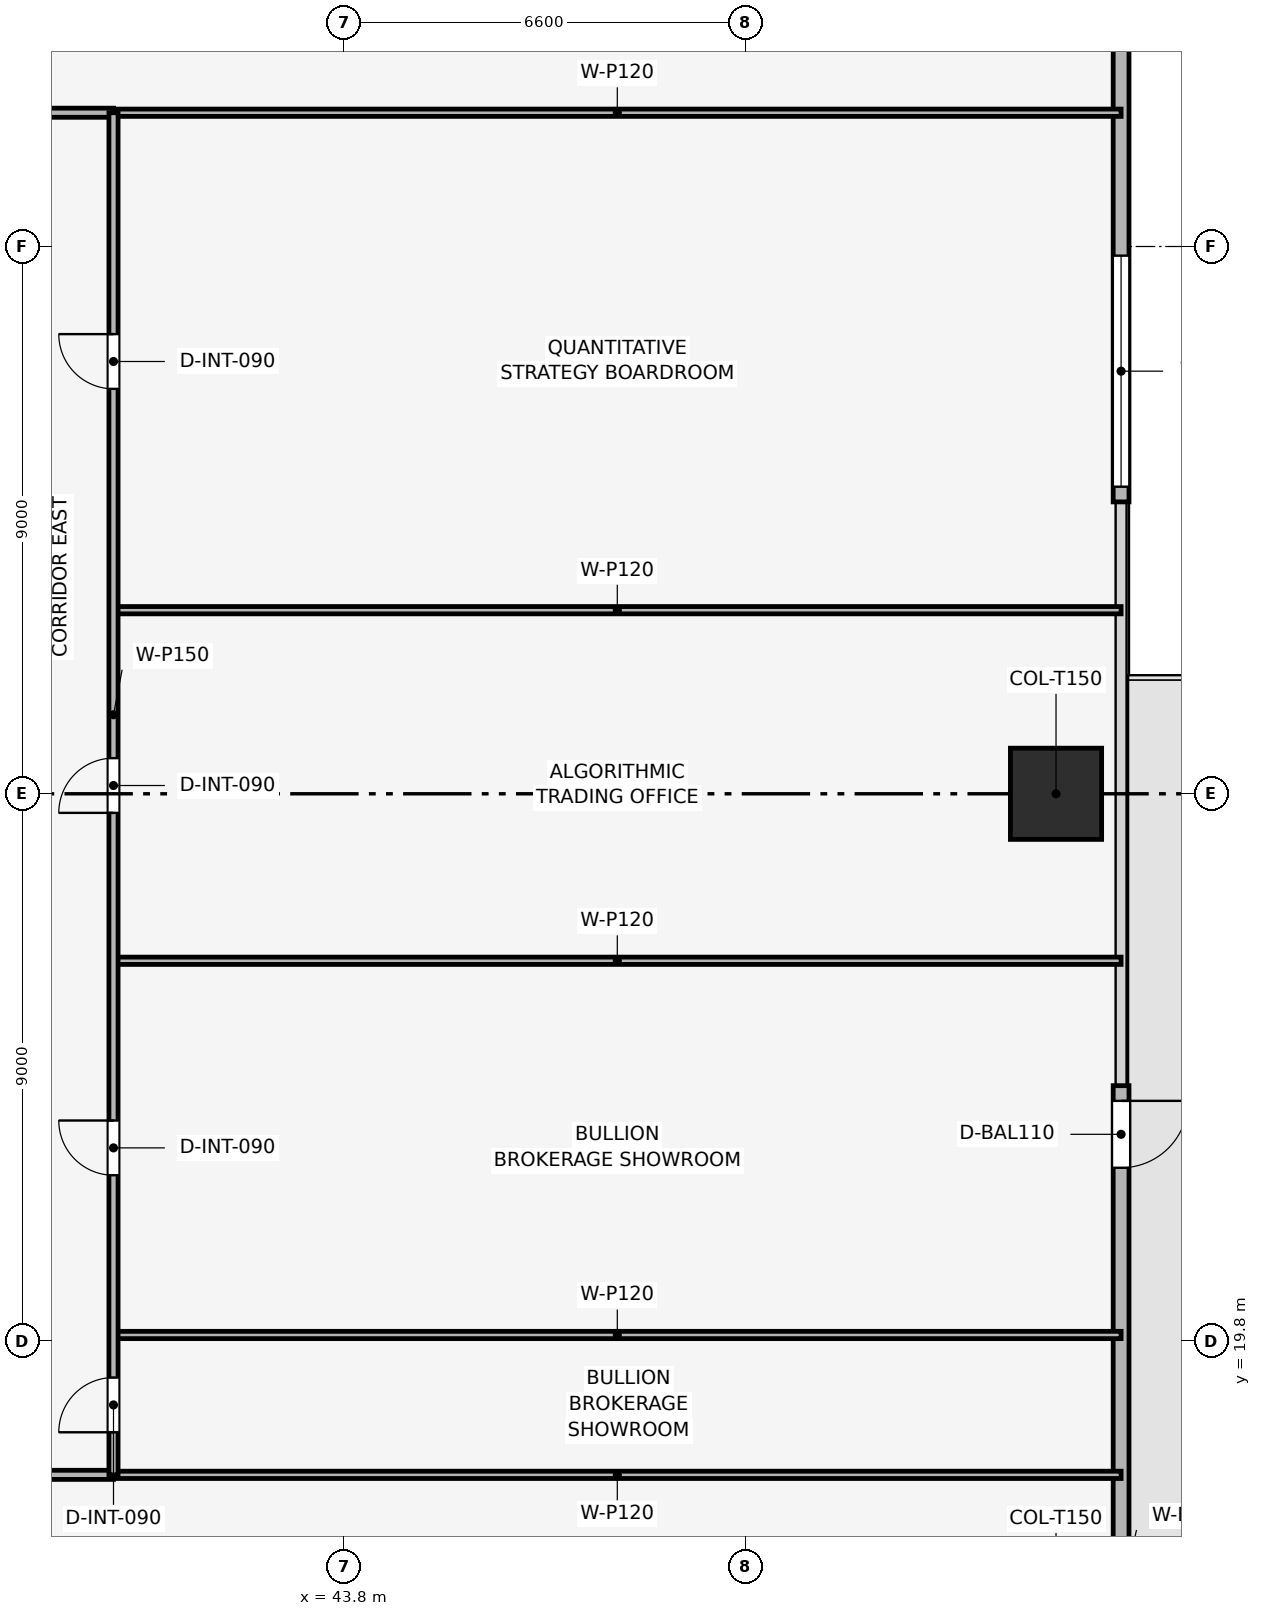
"""IFC4 building model, lengths in metres.
Left out: names, types, materials, properties, quantities, classifications, styles, units other than length and angle.
Written with IfcOpenShell. Run it as: python <this file> out.ifc"""

import sys

from ifc_helpers import new_model, si_unit, direction, frame, frame_2d, origin, origin_2d, place, context, subcontext, project, spatial, rectangle, extrude, element, fill, save


model = new_model("IFC4")
c1 = context("Model", 3, precision=1e-05, world=origin(), true_north=direction((0.0, 1.0)))
c2 = subcontext(c1, "Body", "Model", "MODEL_VIEW")
j1 = project(units=[si_unit("LENGTHUNIT", "METRE"), si_unit("PLANEANGLEUNIT", "RADIAN")], contexts=[c1])
p1 = place(None, origin())
s1 = spatial("IfcSite", under=j1, at=p1, CompositionType="ELEMENT")
p2 = place(p1, origin())
s2 = spatial("IfcBuilding", under=s1, at=p2, CompositionType="ELEMENT")
p3 = place(p2, frame((0.0, 0.0, 76.8)))
s3 = spatial("IfcBuildingStorey", under=s2, at=p3, CompositionType="ELEMENT", Elevation=76.8)
p4 = place(p3, frame((55.5, 28.8, 0.003), z_axis=(0.0, 0.0, 1.0), x_axis=(1.0, 0.0, 0.0)))
e1 = element("IfcColumn", 1, at=p4, inside=s3, PredefinedType="COLUMN", context=c2, shape_type="SweptSolid", body=[
    extrude(rectangle(XDim=1.5, YDim=1.5, at=origin_2d()), origin(), (0.0, 0.0, 1.0), 3.644),
])
p5 = place(p3, frame((56.57, 48.9, 0.0), z_axis=(0.0, 0.0, 1.0), x_axis=(0.0, -1.0, 0.0)))
e2 = element("IfcWall", 2, at=p5, inside=s3, PredefinedType="SOLIDWALL", context=c2, shape_type="SweptSolid", body=[
    extrude(rectangle(XDim=15.3, YDim=0.26, at=frame_2d((7.65, 0.0))), origin(), (0.0, 0.0, 1.0), 3.65),
])
p6 = place(p5, frame((11.25, 0.0, 0.9)))
e3 = element("IfcOpeningElement", 3, at=p6, cuts=e2, PredefinedType="OPENING", context=c2, shape_type="SweptSolid", body=[
    extrude(rectangle(XDim=3.8, YDim=1.9, at=frame_2d((1.9, 0.95))), frame((0.0, 0.14, 0.0), z_axis=(0.0, -1.0, 0.0), x_axis=(1.0, 0.0, 0.0)), (0.0, 0.0, 1.0), 0.28),
])
p7 = place(p3, frame((56.57, 24.0, 0.0), z_axis=(0.0, 0.0, 1.0), x_axis=(0.0, -1.0, 0.0)))
e4 = element("IfcWall", 4, at=p7, inside=s3, PredefinedType="SOLIDWALL", context=c2, shape_type="SweptSolid", body=[
    extrude(rectangle(XDim=15.3, YDim=0.26, at=frame_2d((7.65, 0.0))), origin(), (0.0, 0.0, 1.0), 3.65),
])
p8 = place(p7, frame((0.25, 0.0, 0.0)))
e5 = element("IfcOpeningElement", 5, at=p8, cuts=e4, PredefinedType="OPENING", context=c2, shape_type="SweptSolid", body=[
    extrude(rectangle(XDim=1.1, YDim=2.2, at=frame_2d((0.55, 1.1))), frame((0.0, 0.14, 0.0), z_axis=(0.0, -1.0, 0.0), x_axis=(1.0, 0.0, 0.0)), (0.0, 0.0, 1.0), 0.28),
])
for number, where, z_axis, x_axis in (
    (6, (40.0, 17.6, 0.0), (0.0, 0.0, 1.0), (1.0, 0.0, 0.0)),
    (7, (40.0, 40.0, 0.0), (0.0, 0.0, 1.0), (1.0, 0.0, 0.0)),
    (8, (40.0, 19.9, 0.0), (0.0, 0.0, 1.0), (1.0, 0.0, 0.0)),
    (9, (40.0, 26.054, 0.0), (0.0, 0.0, 1.0), (1.0, 0.0, 0.0)),
    (10, (40.0, 31.819, 0.0), (0.0, 0.0, 1.0), (1.0, 0.0, 0.0)),
):
    element("IfcWall", number, at=place(p3, frame(where, z_axis=z_axis, x_axis=x_axis)), inside=s3, PredefinedType="PARTITIONING", context=c2, shape_type="SweptSolid", body=[
        extrude(rectangle(XDim=16.57, YDim=0.12, at=frame_2d((8.285, 0.0))), origin(), (0.0, 0.0, 1.0), 2.935),
    ])
p9 = place(p3, frame((17.6, 17.6, 0.0), z_axis=(0.0, 0.0, 1.0), x_axis=(1.0, 0.0, 0.0)))
e11 = element("IfcWall", 11, at=p9, inside=s3, PredefinedType="PARTITIONING", context=c2, shape_type="SweptSolid", body=[
    extrude(rectangle(XDim=22.4, YDim=0.15, at=frame_2d((11.2, 0.0))), origin(), (0.0, 0.0, 1.0), 3.085),
])
p10 = place(p9, frame((0.7, 0.0, 0.0)))
e12 = element("IfcOpeningElement", 12, at=p10, cuts=e11, PredefinedType="OPENING", context=c2, shape_type="SweptSolid", body=[
    extrude(rectangle(XDim=0.9, YDim=2.1, at=frame_2d((0.45, 1.05))), frame((0.0, 0.085, 0.0), z_axis=(0.0, -1.0, 0.0), x_axis=(1.0, 0.0, 0.0)), (0.0, 0.0, 1.0), 0.17),
])
p11 = place(p9, frame((6.352, 0.0, 0.0)))
e13 = element("IfcOpeningElement", 13, at=p11, cuts=e11, PredefinedType="OPENING", context=c2, shape_type="SweptSolid", body=[
    extrude(rectangle(XDim=0.9, YDim=2.1, at=frame_2d((0.45, 1.05))), frame((0.0, 0.085, 0.0), z_axis=(0.0, -1.0, 0.0), x_axis=(1.0, 0.0, 0.0)), (0.0, 0.0, 1.0), 0.17),
])
p12 = place(p9, frame((16.402, 0.0, 0.0)))
e14 = element("IfcOpeningElement", 14, at=p12, cuts=e11, PredefinedType="OPENING", context=c2, shape_type="SweptSolid", body=[
    extrude(rectangle(XDim=0.9, YDim=2.1, at=frame_2d((0.45, 1.05))), frame((0.0, 0.085, 0.0), z_axis=(0.0, -1.0, 0.0), x_axis=(1.0, 0.0, 0.0)), (0.0, 0.0, 1.0), 0.17),
])
p13 = place(p3, frame((17.6, 40.0, 0.0), z_axis=(0.0, 0.0, 1.0), x_axis=(1.0, 0.0, 0.0)))
e15 = element("IfcWall", 15, at=p13, inside=s3, PredefinedType="PARTITIONING", context=c2, shape_type="SweptSolid", body=[
    extrude(rectangle(XDim=22.4, YDim=0.15, at=frame_2d((11.2, 0.0))), origin(), (0.0, 0.0, 1.0), 3.085),
])
p14 = place(p13, frame((4.438, 0.0, 0.0)))
e16 = element("IfcOpeningElement", 16, at=p14, cuts=e15, PredefinedType="OPENING", context=c2, shape_type="SweptSolid", body=[
    extrude(rectangle(XDim=0.9, YDim=2.1, at=frame_2d((0.45, 1.05))), frame((0.0, 0.085, 0.0), z_axis=(0.0, -1.0, 0.0), x_axis=(1.0, 0.0, 0.0)), (0.0, 0.0, 1.0), 0.17),
])
p15 = place(p13, frame((15.638, 0.0, 0.0)))
e17 = element("IfcOpeningElement", 17, at=p15, cuts=e15, PredefinedType="OPENING", context=c2, shape_type="SweptSolid", body=[
    extrude(rectangle(XDim=0.9, YDim=2.1, at=frame_2d((0.45, 1.05))), frame((0.0, 0.085, 0.0), z_axis=(0.0, -1.0, 0.0), x_axis=(1.0, 0.0, 0.0)), (0.0, 0.0, 1.0), 0.17),
])
p16 = place(p3, frame((40.0, 17.6, 0.0), z_axis=(0.0, 0.0, 1.0), x_axis=(0.0, 1.0, 0.0)))
e18 = element("IfcWall", 18, at=p16, inside=s3, PredefinedType="PARTITIONING", context=c2, shape_type="SweptSolid", body=[
    extrude(rectangle(XDim=22.4, YDim=0.15, at=frame_2d((11.2, 0.0))), origin(), (0.0, 0.0, 1.0), 3.085),
])
p17 = place(p16, frame((0.7, 0.0, 0.0)))
e19 = element("IfcOpeningElement", 19, at=p17, cuts=e18, PredefinedType="OPENING", context=c2, shape_type="SweptSolid", body=[
    extrude(rectangle(XDim=0.9, YDim=2.1, at=frame_2d((0.45, 1.05))), frame((0.0, 0.085, 0.0), z_axis=(0.0, -1.0, 0.0), x_axis=(1.0, 0.0, 0.0)), (0.0, 0.0, 1.0), 0.17),
])
p18 = place(p16, frame((4.927, 0.0, 0.0)))
e20 = element("IfcOpeningElement", 20, at=p18, cuts=e18, PredefinedType="OPENING", context=c2, shape_type="SweptSolid", body=[
    extrude(rectangle(XDim=0.9, YDim=2.1, at=frame_2d((0.45, 1.05))), frame((0.0, 0.085, 0.0), z_axis=(0.0, -1.0, 0.0), x_axis=(1.0, 0.0, 0.0)), (0.0, 0.0, 1.0), 0.17),
])
p19 = place(p16, frame((10.886, 0.0, 0.0)))
e21 = element("IfcOpeningElement", 21, at=p19, cuts=e18, PredefinedType="OPENING", context=c2, shape_type="SweptSolid", body=[
    extrude(rectangle(XDim=0.9, YDim=2.1, at=frame_2d((0.45, 1.05))), frame((0.0, 0.085, 0.0), z_axis=(0.0, -1.0, 0.0), x_axis=(1.0, 0.0, 0.0)), (0.0, 0.0, 1.0), 0.17),
])
p20 = place(p16, frame((17.859, 0.0, 0.0)))
e22 = element("IfcOpeningElement", 22, at=p20, cuts=e18, PredefinedType="OPENING", context=c2, shape_type="SweptSolid", body=[
    extrude(rectangle(XDim=0.9, YDim=2.1, at=frame_2d((0.45, 1.05))), frame((0.0, 0.085, 0.0), z_axis=(0.0, -1.0, 0.0), x_axis=(1.0, 0.0, 0.0)), (0.0, 0.0, 1.0), 0.17),
])
p21 = place(p8, origin())
e23 = element("IfcDoor", 23, at=p21, inside=s3, OperationType="SINGLE_SWING_LEFT", PredefinedType="DOOR", context=c2, shape_type="SweptSolid", body=[
    extrude(rectangle(XDim=1.1, YDim=2.2, at=frame_2d((0.55, 1.1))), frame((0.0, 0.025, 0.0), z_axis=(0.0, -1.0, 0.0), x_axis=(1.0, 0.0, 0.0)), (0.0, 0.0, 1.0), 0.05),
])
fill(e5, e23)
p22 = place(p6, origin())
e24 = element("IfcWindow", 24, at=p22, inside=s3, PartitioningType="SINGLE_PANEL", PredefinedType="WINDOW", context=c2, shape_type="SweptSolid", body=[
    extrude(rectangle(XDim=3.8, YDim=1.9, at=frame_2d((1.9, 0.95))), frame((0.0, 0.03, 0.0), z_axis=(0.0, -1.0, 0.0), x_axis=(1.0, 0.0, 0.0)), (0.0, 0.0, 1.0), 0.06),
])
fill(e3, e24)
p23 = place(p17, origin())
e25 = element("IfcDoor", 25, at=p23, inside=s3, OperationType="SINGLE_SWING_LEFT", PredefinedType="DOOR", context=c2, shape_type="SweptSolid", body=[
    extrude(rectangle(XDim=0.9, YDim=2.1, at=frame_2d((0.45, 1.05))), frame((0.0, 0.025, 0.0), z_axis=(0.0, -1.0, 0.0), x_axis=(1.0, 0.0, 0.0)), (0.0, 0.0, 1.0), 0.05),
])
fill(e19, e25)
p24 = place(p18, origin())
e26 = element("IfcDoor", 26, at=p24, inside=s3, OperationType="SINGLE_SWING_RIGHT", PredefinedType="DOOR", context=c2, shape_type="SweptSolid", body=[
    extrude(rectangle(XDim=0.9, YDim=2.1, at=frame_2d((0.45, 1.05))), frame((0.0, 0.025, 0.0), z_axis=(0.0, -1.0, 0.0), x_axis=(1.0, 0.0, 0.0)), (0.0, 0.0, 1.0), 0.05),
])
fill(e20, e26)
p25 = place(p19, origin())
e27 = element("IfcDoor", 27, at=p25, inside=s3, OperationType="SINGLE_SWING_LEFT", PredefinedType="DOOR", context=c2, shape_type="SweptSolid", body=[
    extrude(rectangle(XDim=0.9, YDim=2.1, at=frame_2d((0.45, 1.05))), frame((0.0, 0.025, 0.0), z_axis=(0.0, -1.0, 0.0), x_axis=(1.0, 0.0, 0.0)), (0.0, 0.0, 1.0), 0.05),
])
fill(e21, e27)
p26 = place(p20, origin())
e28 = element("IfcDoor", 28, at=p26, inside=s3, OperationType="SINGLE_SWING_RIGHT", PredefinedType="DOOR", context=c2, shape_type="SweptSolid", body=[
    extrude(rectangle(XDim=0.9, YDim=2.1, at=frame_2d((0.45, 1.05))), frame((0.0, 0.025, 0.0), z_axis=(0.0, -1.0, 0.0), x_axis=(1.0, 0.0, 0.0)), (0.0, 0.0, 1.0), 0.05),
])
fill(e22, e28)
save(model, sys.argv[1])
